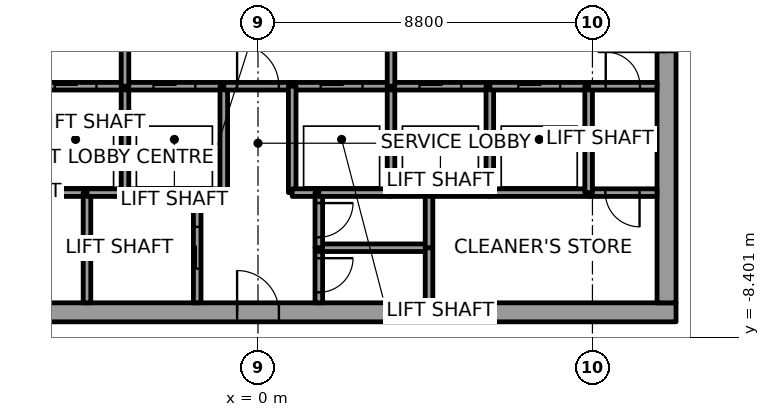
"""IFC4 building model, lengths in metres.
Left out: names, types, materials, properties, quantities, classifications, styles, units other than length and angle.
Written with IfcOpenShell. Run it as: python <this file> out.ifc"""

import sys

from ifc_helpers import new_model, si_unit, direction, frame, frame_2d, origin, place, context, subcontext, project, spatial, rectangle, extrude, element, fill, save


model = new_model("IFC4")
c1 = context("Model", 3, precision=1e-05, world=origin(), true_north=direction((0.0, 1.0)))
c2 = subcontext(c1, "Body", "Model", "MODEL_VIEW")
j1 = project(units=[si_unit("LENGTHUNIT", "METRE"), si_unit("PLANEANGLEUNIT", "RADIAN")], contexts=[c1])
p1 = place(None, origin())
s1 = spatial("IfcSite", under=j1, at=p1, CompositionType="ELEMENT")
p2 = place(p1, origin())
s2 = spatial("IfcBuilding", under=s1, at=p2, CompositionType="ELEMENT")
p3 = place(p2, frame((0.0, 0.0, 169.8)))
s3 = spatial("IfcBuildingStorey", under=s2, at=p3, CompositionType="ELEMENT", Elevation=169.8)
p4 = place(p3, frame((-11.0, -7.75, 0.0), z_axis=(0.0, 0.0, 1.0), x_axis=(1.0, 0.0, 0.0)))
e1 = element("IfcWall", 1, at=p4, inside=s3, PredefinedType="SHEAR", context=c2, shape_type="SweptSolid", body=[
    extrude(rectangle(XDim=22.0, YDim=0.5, at=frame_2d((11.0, 0.0))), origin(), (0.0, 0.0, 1.0), 4.0),
])
p5 = place(p4, frame((10.45, 0.0, 0.0)))
e2 = element("IfcOpeningElement", 2, at=p5, cuts=e1, PredefinedType="OPENING", context=c2, shape_type="SweptSolid", body=[
    extrude(rectangle(XDim=1.1, YDim=2.1, at=frame_2d((0.55, 1.05))), frame((0.0, 0.25, 0.0), z_axis=(0.0, -1.0, 0.0), x_axis=(1.0, 0.0, 0.0)), (0.0, 0.0, 1.0), 0.5),
])
p6 = place(p3, frame((10.75, -7.5, 0.0), z_axis=(0.0, 0.0, 1.0), x_axis=(0.0, 1.0, 0.0)))
e3 = element("IfcWall", 3, at=p6, inside=s3, PredefinedType="SHEAR", context=c2, shape_type="SweptSolid", body=[
    extrude(rectangle(XDim=15.0, YDim=0.5, at=frame_2d((7.5, 0.0))), origin(), (0.0, 0.0, 1.0), 4.0),
])
p7 = place(p6, frame((6.6, 0.0, 0.0)))
e4 = element("IfcOpeningElement", 4, at=p7, cuts=e3, PredefinedType="OPENING", context=c2, shape_type="SweptSolid", body=[
    extrude(rectangle(XDim=1.8, YDim=2.1, at=frame_2d((0.9, 1.05))), frame((0.0, 0.25, 0.0), z_axis=(0.0, -1.0, 0.0), x_axis=(1.0, 0.0, 0.0)), (0.0, 0.0, 1.0), 0.5),
])
p8 = place(p3, frame((-6.1, -4.6, 0.0), z_axis=(0.0, 0.0, 1.0), x_axis=(1.0, 0.0, 0.0)))
e5 = element("IfcWall", 5, at=p8, inside=s3, PredefinedType="SOLIDWALL", context=c2, shape_type="SweptSolid", body=[
    extrude(rectangle(XDim=1.6, YDim=0.2, at=frame_2d((0.8, 0.0))), origin(), (0.0, 0.0, 1.0), 3.85),
])
p9 = place(p3, frame((-6.1, -1.8, 0.0), z_axis=(0.0, 0.0, 1.0), x_axis=(1.0, 0.0, 0.0)))
e6 = element("IfcWall", 6, at=p9, inside=s3, PredefinedType="SOLIDWALL", context=c2, shape_type="SweptSolid", body=[
    extrude(rectangle(XDim=2.6, YDim=0.2, at=frame_2d((1.3, 0.0))), origin(), (0.0, 0.0, 1.0), 3.85),
])
p10 = place(p9, frame((0.75, 0.0, 0.0)))
e7 = element("IfcOpeningElement", 7, at=p10, cuts=e6, PredefinedType="OPENING", context=c2, shape_type="SweptSolid", body=[
    extrude(rectangle(XDim=1.1, YDim=2.1, at=frame_2d((0.55, 1.05))), frame((0.0, 0.1, 0.0), z_axis=(0.0, -1.0, 0.0), x_axis=(1.0, 0.0, 0.0)), (0.0, 0.0, 1.0), 0.2),
])
p11 = place(p3, frame((-4.5, -4.6, 0.0), z_axis=(0.0, 0.0, 1.0), x_axis=(0.0, -1.0, 0.0)))
e8 = element("IfcWall", 8, at=p11, inside=s3, PredefinedType="SOLIDWALL", context=c2, shape_type="SweptSolid", body=[
    extrude(rectangle(XDim=2.9, YDim=0.2, at=frame_2d((1.45, 0.0))), origin(), (0.0, 0.0, 1.0), 3.85),
])
p12 = place(p3, frame((-4.5, -4.6, 0.0), z_axis=(0.0, 0.0, 1.0), x_axis=(1.0, 0.0, 0.0)))
e9 = element("IfcWall", 9, at=p12, inside=s3, PredefinedType="SOLIDWALL", context=c2, shape_type="SweptSolid", body=[
    extrude(rectangle(XDim=1.0, YDim=0.2, at=frame_2d((0.5, 0.0))), origin(), (0.0, 0.0, 1.0), 3.85),
])
p13 = place(p3, frame((-3.5, -4.6, 0.0), z_axis=(0.0, 0.0, 1.0), x_axis=(1.0, 0.0, 0.0)))
e10 = element("IfcWall", 10, at=p13, inside=s3, PredefinedType="SOLIDWALL", context=c2, shape_type="SweptSolid", body=[
    extrude(rectangle(XDim=1.9, YDim=0.2, at=frame_2d((0.95, 0.0))), origin(), (0.0, 0.0, 1.0), 3.85),
])
p14 = place(p3, frame((-3.5, -4.6, 0.0), z_axis=(0.0, 0.0, 1.0), x_axis=(0.0, 1.0, 0.0)))
e11 = element("IfcWall", 11, at=p14, inside=s3, PredefinedType="SOLIDWALL", context=c2, shape_type="SweptSolid", body=[
    extrude(rectangle(XDim=2.8, YDim=0.2, at=frame_2d((1.4, 0.0))), origin(), (0.0, 0.0, 1.0), 3.85),
])
p15 = place(p3, frame((-3.5, -1.8, 0.0), z_axis=(0.0, 0.0, 1.0), x_axis=(1.0, 0.0, 0.0)))
e12 = element("IfcWall", 12, at=p15, inside=s3, PredefinedType="SOLIDWALL", context=c2, shape_type="SweptSolid", body=[
    extrude(rectangle(XDim=2.6, YDim=0.2, at=frame_2d((1.3, 0.0))), origin(), (0.0, 0.0, 1.0), 3.85),
])
p16 = place(p15, frame((0.75, 0.0, 0.0)))
e13 = element("IfcOpeningElement", 13, at=p16, cuts=e12, PredefinedType="OPENING", context=c2, shape_type="SweptSolid", body=[
    extrude(rectangle(XDim=1.1, YDim=2.1, at=frame_2d((0.55, 1.05))), frame((0.0, 0.1, 0.0), z_axis=(0.0, -1.0, 0.0), x_axis=(1.0, 0.0, 0.0)), (0.0, 0.0, 1.0), 0.2),
])
p17 = place(p3, frame((-3.5, 1.8, 0.0), z_axis=(0.0, 0.0, 1.0), x_axis=(0.0, -1.0, 0.0)))
e14 = element("IfcWall", 14, at=p17, inside=s3, PredefinedType="SOLIDWALL", context=c2, shape_type="SweptSolid", body=[
    extrude(rectangle(XDim=3.6, YDim=0.2, at=frame_2d((1.8, 0.0))), origin(), (0.0, 0.0, 1.0), 3.85),
])
p18 = place(p17, frame((1.05, 0.0, 0.0)))
e15 = element("IfcOpeningElement", 15, at=p18, cuts=e14, PredefinedType="OPENING", context=c2, shape_type="SweptSolid", body=[
    extrude(rectangle(XDim=1.5, YDim=2.1, at=frame_2d((0.75, 1.05))), frame((0.0, 0.1, 0.0), z_axis=(0.0, -1.0, 0.0), x_axis=(1.0, 0.0, 0.0)), (0.0, 0.0, 1.0), 0.2),
])
p19 = place(p3, frame((-1.6, -7.5, 0.0), z_axis=(0.0, 0.0, 1.0), x_axis=(0.0, 1.0, 0.0)))
e16 = element("IfcWall", 16, at=p19, inside=s3, PredefinedType="SOLIDWALL", context=c2, shape_type="SweptSolid", body=[
    extrude(rectangle(XDim=2.9, YDim=0.2, at=frame_2d((1.45, 0.0))), origin(), (0.0, 0.0, 1.0), 3.85),
])
p20 = place(p19, frame((0.9, 0.0, 0.0)))
e17 = element("IfcOpeningElement", 17, at=p20, cuts=e16, PredefinedType="OPENING", context=c2, shape_type="SweptSolid", body=[
    extrude(rectangle(XDim=1.1, YDim=2.1, at=frame_2d((0.55, 1.05))), frame((0.0, 0.1, 0.0), z_axis=(0.0, -1.0, 0.0), x_axis=(1.0, 0.0, 0.0)), (0.0, 0.0, 1.0), 0.2),
])
p21 = place(p3, frame((-1.6, -4.6, 0.0), z_axis=(0.0, 0.0, 1.0), x_axis=(1.0, 0.0, 0.0)))
e18 = element("IfcWall", 18, at=p21, inside=s3, PredefinedType="SOLIDWALL", context=c2, shape_type="SweptSolid", body=[
    extrude(rectangle(XDim=0.7, YDim=0.2, at=frame_2d((0.35, 0.0))), origin(), (0.0, 0.0, 1.0), 3.85),
])
p22 = place(p3, frame((-0.9, -4.6, 0.0), z_axis=(0.0, 0.0, 1.0), x_axis=(0.0, 1.0, 0.0)))
e19 = element("IfcWall", 19, at=p22, inside=s3, PredefinedType="SOLIDWALL", context=c2, shape_type="SweptSolid", body=[
    extrude(rectangle(XDim=2.8, YDim=0.2, at=frame_2d((1.4, 0.0))), origin(), (0.0, 0.0, 1.0), 3.85),
])
p23 = place(p3, frame((-0.9, -1.8, 0.0), z_axis=(0.0, 0.0, 1.0), x_axis=(1.0, 0.0, 0.0)))
e20 = element("IfcWall", 20, at=p23, inside=s3, PredefinedType="SOLIDWALL", context=c2, shape_type="SweptSolid", body=[
    extrude(rectangle(XDim=1.8, YDim=0.2, at=frame_2d((0.9, 0.0))), origin(), (0.0, 0.0, 1.0), 3.85),
])
p24 = place(p23, frame((0.35, 0.0, 0.0)))
e21 = element("IfcOpeningElement", 21, at=p24, cuts=e20, PredefinedType="OPENING", context=c2, shape_type="SweptSolid", body=[
    extrude(rectangle(XDim=1.1, YDim=2.1, at=frame_2d((0.55, 1.05))), frame((0.0, 0.1, 0.0), z_axis=(0.0, -1.0, 0.0), x_axis=(1.0, 0.0, 0.0)), (0.0, 0.0, 1.0), 0.2),
])
p25 = place(p3, frame((0.9, -1.8, 0.0), z_axis=(0.0, 0.0, 1.0), x_axis=(1.0, 0.0, 0.0)))
e22 = element("IfcWall", 22, at=p25, inside=s3, PredefinedType="SOLIDWALL", context=c2, shape_type="SweptSolid", body=[
    extrude(rectangle(XDim=2.6, YDim=0.2, at=frame_2d((1.3, 0.0))), origin(), (0.0, 0.0, 1.0), 3.85),
])
p26 = place(p25, frame((0.75, 0.0, 0.0)))
e23 = element("IfcOpeningElement", 23, at=p26, cuts=e22, PredefinedType="OPENING", context=c2, shape_type="SweptSolid", body=[
    extrude(rectangle(XDim=1.1, YDim=2.1, at=frame_2d((0.55, 1.05))), frame((0.0, 0.1, 0.0), z_axis=(0.0, -1.0, 0.0), x_axis=(1.0, 0.0, 0.0)), (0.0, 0.0, 1.0), 0.2),
])
p27 = place(p3, frame((0.9, -1.8, 0.0), z_axis=(0.0, 0.0, 1.0), x_axis=(0.0, -1.0, 0.0)))
e24 = element("IfcWall", 24, at=p27, inside=s3, PredefinedType="SOLIDWALL", context=c2, shape_type="SweptSolid", body=[
    extrude(rectangle(XDim=2.8, YDim=0.2, at=frame_2d((1.4, 0.0))), origin(), (0.0, 0.0, 1.0), 3.85),
])
p28 = place(p3, frame((0.9, -4.6, 0.0), z_axis=(0.0, 0.0, 1.0), x_axis=(1.0, 0.0, 0.0)))
e25 = element("IfcWall", 25, at=p28, inside=s3, PredefinedType="SOLIDWALL", context=c2, shape_type="SweptSolid", body=[
    extrude(rectangle(XDim=0.7, YDim=0.2, at=frame_2d((0.35, 0.0))), origin(), (0.0, 0.0, 1.0), 3.85),
])
p29 = place(p3, frame((1.6, -6.05, 0.0), z_axis=(0.0, 0.0, 1.0), x_axis=(0.0, -1.0, 0.0)))
e26 = element("IfcWall", 26, at=p29, inside=s3, PredefinedType="SOLIDWALL", context=c2, shape_type="SweptSolid", body=[
    extrude(rectangle(XDim=1.45, YDim=0.2, at=frame_2d((0.725, 0.0))), origin(), (0.0, 0.0, 1.0), 3.85),
])
p30 = place(p29, frame((0.275, 0.0, 0.0)))
e27 = element("IfcOpeningElement", 27, at=p30, cuts=e26, PredefinedType="OPENING", context=c2, shape_type="SweptSolid", body=[
    extrude(rectangle(XDim=0.9, YDim=2.1, at=frame_2d((0.45, 1.05))), frame((0.0, 0.1, 0.0), z_axis=(0.0, -1.0, 0.0), x_axis=(1.0, 0.0, 0.0)), (0.0, 0.0, 1.0), 0.2),
])
p31 = place(p3, frame((4.5, -6.05, 0.0), z_axis=(0.0, 0.0, 1.0), x_axis=(-1.0, 0.0, 0.0)))
e28 = element("IfcWall", 28, at=p31, inside=s3, PredefinedType="SOLIDWALL", context=c2, shape_type="SweptSolid", body=[
    extrude(rectangle(XDim=2.9, YDim=0.2, at=frame_2d((1.45, 0.0))), origin(), (0.0, 0.0, 1.0), 3.85),
])
p32 = place(p3, frame((1.6, -4.6, 0.0), z_axis=(0.0, 0.0, 1.0), x_axis=(0.0, -1.0, 0.0)))
e29 = element("IfcWall", 29, at=p32, inside=s3, PredefinedType="SOLIDWALL", context=c2, shape_type="SweptSolid", body=[
    extrude(rectangle(XDim=1.45, YDim=0.2, at=frame_2d((0.725, 0.0))), origin(), (0.0, 0.0, 1.0), 3.85),
])
p33 = place(p32, frame((0.275, 0.0, 0.0)))
e30 = element("IfcOpeningElement", 30, at=p33, cuts=e29, PredefinedType="OPENING", context=c2, shape_type="SweptSolid", body=[
    extrude(rectangle(XDim=0.9, YDim=2.1, at=frame_2d((0.45, 1.05))), frame((0.0, 0.1, 0.0), z_axis=(0.0, -1.0, 0.0), x_axis=(1.0, 0.0, 0.0)), (0.0, 0.0, 1.0), 0.2),
])
p34 = place(p3, frame((3.5, -4.6, 0.0), z_axis=(0.0, 0.0, 1.0), x_axis=(-1.0, 0.0, 0.0)))
e31 = element("IfcWall", 31, at=p34, inside=s3, PredefinedType="SOLIDWALL", context=c2, shape_type="SweptSolid", body=[
    extrude(rectangle(XDim=1.9, YDim=0.2, at=frame_2d((0.95, 0.0))), origin(), (0.0, 0.0, 1.0), 3.85),
])
p35 = place(p3, frame((4.5, -4.6, 0.0), z_axis=(0.0, 0.0, 1.0), x_axis=(-1.0, 0.0, 0.0)))
e32 = element("IfcWall", 32, at=p35, inside=s3, PredefinedType="SOLIDWALL", context=c2, shape_type="SweptSolid", body=[
    extrude(rectangle(XDim=1.0, YDim=0.2, at=frame_2d((0.5, 0.0))), origin(), (0.0, 0.0, 1.0), 3.85),
])
p36 = place(p3, frame((3.5, -4.6, 0.0), z_axis=(0.0, 0.0, 1.0), x_axis=(0.0, 1.0, 0.0)))
e33 = element("IfcWall", 33, at=p36, inside=s3, PredefinedType="SOLIDWALL", context=c2, shape_type="SweptSolid", body=[
    extrude(rectangle(XDim=2.8, YDim=0.2, at=frame_2d((1.4, 0.0))), origin(), (0.0, 0.0, 1.0), 3.85),
])
p37 = place(p3, frame((3.5, -1.8, 0.0), z_axis=(0.0, 0.0, 1.0), x_axis=(1.0, 0.0, 0.0)))
e34 = element("IfcWall", 34, at=p37, inside=s3, PredefinedType="SOLIDWALL", context=c2, shape_type="SweptSolid", body=[
    extrude(rectangle(XDim=2.6, YDim=0.2, at=frame_2d((1.3, 0.0))), origin(), (0.0, 0.0, 1.0), 3.85),
])
p38 = place(p37, frame((0.75, 0.0, 0.0)))
e35 = element("IfcOpeningElement", 35, at=p38, cuts=e34, PredefinedType="OPENING", context=c2, shape_type="SweptSolid", body=[
    extrude(rectangle(XDim=1.1, YDim=2.1, at=frame_2d((0.55, 1.05))), frame((0.0, 0.1, 0.0), z_axis=(0.0, -1.0, 0.0), x_axis=(1.0, 0.0, 0.0)), (0.0, 0.0, 1.0), 0.2),
])
p39 = place(p3, frame((3.5, -1.8, 0.0), z_axis=(0.0, 0.0, 1.0), x_axis=(0.0, 1.0, 0.0)))
e36 = element("IfcWall", 36, at=p39, inside=s3, PredefinedType="SOLIDWALL", context=c2, shape_type="SweptSolid", body=[
    extrude(rectangle(XDim=3.6, YDim=0.2, at=frame_2d((1.8, 0.0))), origin(), (0.0, 0.0, 1.0), 3.85),
])
p40 = place(p39, frame((1.05, 0.0, 0.0)))
e37 = element("IfcOpeningElement", 37, at=p40, cuts=e36, PredefinedType="OPENING", context=c2, shape_type="SweptSolid", body=[
    extrude(rectangle(XDim=1.5, YDim=2.1, at=frame_2d((0.75, 1.05))), frame((0.0, 0.1, 0.0), z_axis=(0.0, -1.0, 0.0), x_axis=(1.0, 0.0, 0.0)), (0.0, 0.0, 1.0), 0.2),
])
for number, where, z_axis, x_axis in (
    (38, (4.5, -6.05, 0.0), (0.0, 0.0, 1.0), (0.0, -1.0, 0.0)),
    (39, (4.5, -4.6, 0.0), (0.0, 0.0, 1.0), (0.0, -1.0, 0.0)),
):
    element("IfcWall", number, at=place(p3, frame(where, z_axis=z_axis, x_axis=x_axis)), inside=s3, PredefinedType="SOLIDWALL", context=c2, shape_type="SweptSolid", body=[
        extrude(rectangle(XDim=1.45, YDim=0.2, at=frame_2d((0.725, 0.0))), origin(), (0.0, 0.0, 1.0), 3.85),
    ])
p41 = place(p3, frame((6.1, -4.6, 0.0), z_axis=(0.0, 0.0, 1.0), x_axis=(-1.0, 0.0, 0.0)))
e40 = element("IfcWall", 40, at=p41, inside=s3, PredefinedType="SOLIDWALL", context=c2, shape_type="SweptSolid", body=[
    extrude(rectangle(XDim=1.6, YDim=0.2, at=frame_2d((0.8, 0.0))), origin(), (0.0, 0.0, 1.0), 3.85),
])
p42 = place(p3, frame((8.7, -4.6, 0.0), z_axis=(0.0, 0.0, 1.0), x_axis=(-1.0, 0.0, 0.0)))
e41 = element("IfcWall", 41, at=p42, inside=s3, PredefinedType="SOLIDWALL", context=c2, shape_type="SweptSolid", body=[
    extrude(rectangle(XDim=2.6, YDim=0.2, at=frame_2d((1.3, 0.0))), origin(), (0.0, 0.0, 1.0), 3.85),
])
p43 = place(p3, frame((6.1, -4.6, 0.0), z_axis=(0.0, 0.0, 1.0), x_axis=(0.0, 1.0, 0.0)))
e42 = element("IfcWall", 42, at=p43, inside=s3, PredefinedType="SOLIDWALL", context=c2, shape_type="SweptSolid", body=[
    extrude(rectangle(XDim=2.8, YDim=0.2, at=frame_2d((1.4, 0.0))), origin(), (0.0, 0.0, 1.0), 3.85),
])
p44 = place(p3, frame((6.1, -1.8, 0.0), z_axis=(0.0, 0.0, 1.0), x_axis=(1.0, 0.0, 0.0)))
e43 = element("IfcWall", 43, at=p44, inside=s3, PredefinedType="SOLIDWALL", context=c2, shape_type="SweptSolid", body=[
    extrude(rectangle(XDim=2.6, YDim=0.2, at=frame_2d((1.3, 0.0))), origin(), (0.0, 0.0, 1.0), 3.85),
])
p45 = place(p44, frame((0.75, 0.0, 0.0)))
e44 = element("IfcOpeningElement", 44, at=p45, cuts=e43, PredefinedType="OPENING", context=c2, shape_type="SweptSolid", body=[
    extrude(rectangle(XDim=1.1, YDim=2.1, at=frame_2d((0.55, 1.05))), frame((0.0, 0.1, 0.0), z_axis=(0.0, -1.0, 0.0), x_axis=(1.0, 0.0, 0.0)), (0.0, 0.0, 1.0), 0.2),
])
p46 = place(p3, frame((10.5, -4.6, 0.0), z_axis=(0.0, 0.0, 1.0), x_axis=(-1.0, 0.0, 0.0)))
e45 = element("IfcWall", 45, at=p46, inside=s3, PredefinedType="SOLIDWALL", context=c2, shape_type="SweptSolid", body=[
    extrude(rectangle(XDim=1.8, YDim=0.2, at=frame_2d((0.9, 0.0))), origin(), (0.0, 0.0, 1.0), 3.85),
])
p47 = place(p46, frame((0.46, 0.0, 0.0)))
e46 = element("IfcOpeningElement", 46, at=p47, cuts=e45, PredefinedType="OPENING", context=c2, shape_type="SweptSolid", body=[
    extrude(rectangle(XDim=0.9, YDim=2.1, at=frame_2d((0.45, 1.05))), frame((0.0, 0.1, 0.0), z_axis=(0.0, -1.0, 0.0), x_axis=(1.0, 0.0, 0.0)), (0.0, 0.0, 1.0), 0.2),
])
p48 = place(p3, frame((8.7, -1.8, 0.0), z_axis=(0.0, 0.0, 1.0), x_axis=(0.0, -1.0, 0.0)))
e47 = element("IfcWall", 47, at=p48, inside=s3, PredefinedType="SOLIDWALL", context=c2, shape_type="SweptSolid", body=[
    extrude(rectangle(XDim=2.8, YDim=0.2, at=frame_2d((1.4, 0.0))), origin(), (0.0, 0.0, 1.0), 3.85),
])
p49 = place(p3, frame((8.7, -1.8, 0.0), z_axis=(0.0, 0.0, 1.0), x_axis=(1.0, 0.0, 0.0)))
e48 = element("IfcWall", 48, at=p49, inside=s3, PredefinedType="SOLIDWALL", context=c2, shape_type="SweptSolid", body=[
    extrude(rectangle(XDim=1.8, YDim=0.2, at=frame_2d((0.9, 0.0))), origin(), (0.0, 0.0, 1.0), 3.85),
])
p50 = place(p49, frame((0.45, 0.0, 0.0)))
e49 = element("IfcOpeningElement", 49, at=p50, cuts=e48, PredefinedType="OPENING", context=c2, shape_type="SweptSolid", body=[
    extrude(rectangle(XDim=0.9, YDim=2.1, at=frame_2d((0.45, 1.05))), frame((0.0, 0.1, 0.0), z_axis=(0.0, -1.0, 0.0), x_axis=(1.0, 0.0, 0.0)), (0.0, 0.0, 1.0), 0.2),
])
p51 = place(p10, origin())
e50 = element("IfcDoor", 50, at=p51, inside=s3, OperationType="SLIDING_TO_LEFT", PredefinedType="DOOR", context=c2, shape_type="SweptSolid", body=[
    extrude(rectangle(XDim=1.1, YDim=2.1, at=frame_2d((0.55, 1.05))), frame((0.0, 0.025, 0.0), z_axis=(0.0, -1.0, 0.0), x_axis=(1.0, 0.0, 0.0)), (0.0, 0.0, 1.0), 0.05),
])
fill(e7, e50)
p52 = place(p16, origin())
e51 = element("IfcDoor", 51, at=p52, inside=s3, OperationType="SLIDING_TO_RIGHT", PredefinedType="DOOR", context=c2, shape_type="SweptSolid", body=[
    extrude(rectangle(XDim=1.1, YDim=2.1, at=frame_2d((0.55, 1.05))), frame((0.0, 0.025, 0.0), z_axis=(0.0, -1.0, 0.0), x_axis=(1.0, 0.0, 0.0)), (0.0, 0.0, 1.0), 0.05),
])
fill(e13, e51)
p53 = place(p26, origin())
e52 = element("IfcDoor", 52, at=p53, inside=s3, OperationType="SLIDING_TO_LEFT", PredefinedType="DOOR", context=c2, shape_type="SweptSolid", body=[
    extrude(rectangle(XDim=1.1, YDim=2.1, at=frame_2d((0.55, 1.05))), frame((0.0, 0.025, 0.0), z_axis=(0.0, -1.0, 0.0), x_axis=(1.0, 0.0, 0.0)), (0.0, 0.0, 1.0), 0.05),
])
fill(e23, e52)
p54 = place(p38, origin())
e53 = element("IfcDoor", 53, at=p54, inside=s3, OperationType="SLIDING_TO_LEFT", PredefinedType="DOOR", context=c2, shape_type="SweptSolid", body=[
    extrude(rectangle(XDim=1.1, YDim=2.1, at=frame_2d((0.55, 1.05))), frame((0.0, 0.025, 0.0), z_axis=(0.0, -1.0, 0.0), x_axis=(1.0, 0.0, 0.0)), (0.0, 0.0, 1.0), 0.05),
])
fill(e35, e53)
p55 = place(p45, origin())
e54 = element("IfcDoor", 54, at=p55, inside=s3, OperationType="SLIDING_TO_RIGHT", PredefinedType="DOOR", context=c2, shape_type="SweptSolid", body=[
    extrude(rectangle(XDim=1.1, YDim=2.1, at=frame_2d((0.55, 1.05))), frame((0.0, 0.025, 0.0), z_axis=(0.0, -1.0, 0.0), x_axis=(1.0, 0.0, 0.0)), (0.0, 0.0, 1.0), 0.05),
])
fill(e44, e54)
p56 = place(p20, origin())
e55 = element("IfcDoor", 55, at=p56, inside=s3, OperationType="SLIDING_TO_LEFT", PredefinedType="DOOR", context=c2, shape_type="SweptSolid", body=[
    extrude(rectangle(XDim=1.1, YDim=2.1, at=frame_2d((0.55, 1.05))), frame((0.0, 0.025, 0.0), z_axis=(0.0, -1.0, 0.0), x_axis=(1.0, 0.0, 0.0)), (0.0, 0.0, 1.0), 0.05),
])
fill(e17, e55)
p57 = place(p24, origin())
e56 = element("IfcDoor", 56, at=p57, inside=s3, OperationType="SINGLE_SWING_LEFT", PredefinedType="DOOR", context=c2, shape_type="SweptSolid", body=[
    extrude(rectangle(XDim=1.1, YDim=2.1, at=frame_2d((0.55, 1.05))), frame((0.0, 0.025, 0.0), z_axis=(0.0, -1.0, 0.0), x_axis=(1.0, 0.0, 0.0)), (0.0, 0.0, 1.0), 0.05),
])
fill(e21, e56)
p58 = place(p47, origin())
e57 = element("IfcDoor", 57, at=p58, inside=s3, OperationType="SINGLE_SWING_LEFT", PredefinedType="DOOR", context=c2, shape_type="SweptSolid", body=[
    extrude(rectangle(XDim=0.9, YDim=2.1, at=frame_2d((0.45, 1.05))), frame((0.0, 0.025, 0.0), z_axis=(0.0, -1.0, 0.0), x_axis=(1.0, 0.0, 0.0)), (0.0, 0.0, 1.0), 0.05),
])
fill(e46, e57)
p59 = place(p50, origin())
e58 = element("IfcDoor", 58, at=p59, inside=s3, OperationType="SINGLE_SWING_LEFT", PredefinedType="DOOR", context=c2, shape_type="SweptSolid", body=[
    extrude(rectangle(XDim=0.9, YDim=2.1, at=frame_2d((0.45, 1.05))), frame((0.0, 0.025, 0.0), z_axis=(0.0, -1.0, 0.0), x_axis=(1.0, 0.0, 0.0)), (0.0, 0.0, 1.0), 0.05),
])
fill(e49, e58)
p60 = place(p30, origin())
e59 = element("IfcDoor", 59, at=p60, inside=s3, OperationType="SINGLE_SWING_LEFT", PredefinedType="DOOR", context=c2, shape_type="SweptSolid", body=[
    extrude(rectangle(XDim=0.9, YDim=2.1, at=frame_2d((0.45, 1.05))), frame((0.0, 0.025, 0.0), z_axis=(0.0, -1.0, 0.0), x_axis=(1.0, 0.0, 0.0)), (0.0, 0.0, 1.0), 0.05),
])
fill(e27, e59)
p61 = place(p33, origin())
e60 = element("IfcDoor", 60, at=p61, inside=s3, OperationType="SINGLE_SWING_LEFT", PredefinedType="DOOR", context=c2, shape_type="SweptSolid", body=[
    extrude(rectangle(XDim=0.9, YDim=2.1, at=frame_2d((0.45, 1.05))), frame((0.0, 0.025, 0.0), z_axis=(0.0, -1.0, 0.0), x_axis=(1.0, 0.0, 0.0)), (0.0, 0.0, 1.0), 0.05),
])
fill(e30, e60)
p62 = place(p7, origin())
e61 = element("IfcDoor", 61, at=p62, inside=s3, OperationType="DOUBLE_DOOR_SINGLE_SWING", PredefinedType="DOOR", context=c2, shape_type="SweptSolid", body=[
    extrude(rectangle(XDim=1.8, YDim=2.1, at=frame_2d((0.9, 1.05))), frame((0.0, 0.025, 0.0), z_axis=(0.0, -1.0, 0.0), x_axis=(1.0, 0.0, 0.0)), (0.0, 0.0, 1.0), 0.05),
])
fill(e4, e61)
p63 = place(p5, origin())
e62 = element("IfcDoor", 62, at=p63, inside=s3, OperationType="SINGLE_SWING_RIGHT", PredefinedType="DOOR", context=c2, shape_type="SweptSolid", body=[
    extrude(rectangle(XDim=1.1, YDim=2.1, at=frame_2d((0.55, 1.05))), frame((0.0, 0.025, 0.0), z_axis=(0.0, -1.0, 0.0), x_axis=(1.0, 0.0, 0.0)), (0.0, 0.0, 1.0), 0.05),
])
fill(e2, e62)
save(model, sys.argv[1])
